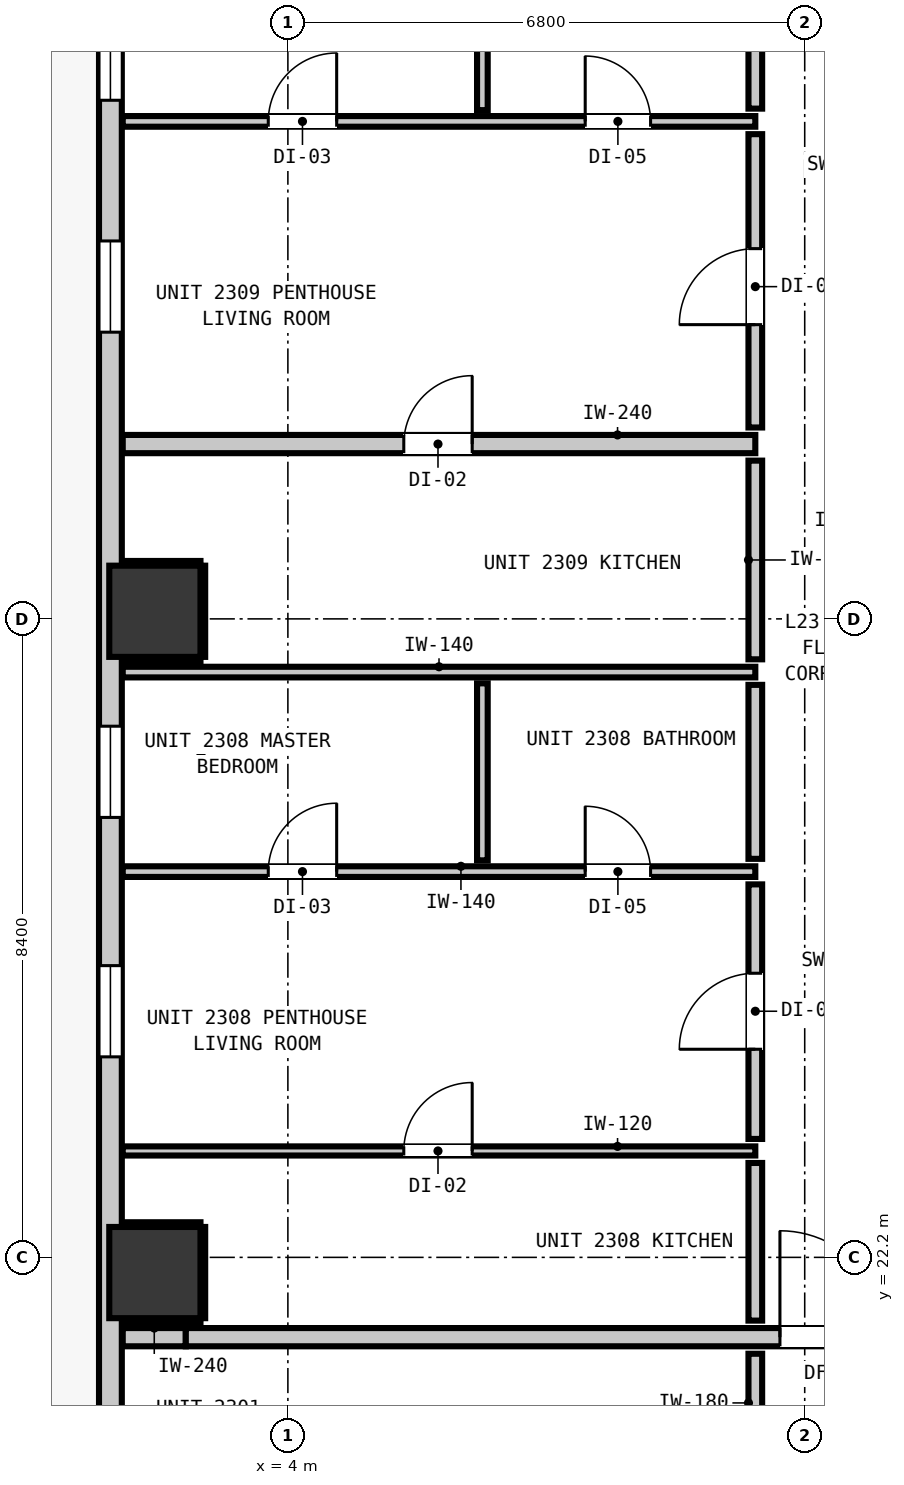
"""IFC4 building model, lengths in metres.
Left out: names, types, materials, properties, quantities, classifications, styles, units other than length and angle.
Written with IfcOpenShell. Run it as: python <this file> out.ifc"""

import sys

from ifc_helpers import new_model, si_unit, direction, frame, frame_2d, origin, origin_2d, place, context, subcontext, project, spatial, rectangle, extrude, element, fill, save


model = new_model("IFC4")
c1 = context("Model", 3, precision=1e-05, world=origin(), true_north=direction((0.0, 1.0)))
c2 = subcontext(c1, "Body", "Model", "MODEL_VIEW")
j1 = project(units=[si_unit("LENGTHUNIT", "METRE"), si_unit("PLANEANGLEUNIT", "RADIAN")], contexts=[c1])
p1 = place(None, origin())
s1 = spatial("IfcSite", under=j1, at=p1, CompositionType="ELEMENT")
p2 = place(p1, origin())
s2 = spatial("IfcBuilding", under=s1, at=p2, CompositionType="ELEMENT")
p3 = place(p2, frame((0.0, 0.0, 81.76)))
s3 = spatial("IfcBuildingStorey", under=s2, at=p3, CompositionType="ELEMENT", Elevation=81.76)
for number, where, z_axis, x_axis in (
    (1, (2.25, 22.0, -0.2), (0.0, 0.0, 1.0), (1.0, 0.0, 0.0)),
    (2, (2.25, 30.7, -0.2), (0.0, 0.0, 1.0), (1.0, 0.0, 0.0)),
):
    element("IfcColumn", number, at=place(p3, frame(where, z_axis=z_axis, x_axis=x_axis)), inside=s3, PredefinedType="COLUMN", context=c2, shape_type="SweptSolid", body=[
        extrude(rectangle(XDim=1.2, YDim=1.2, at=origin_2d()), origin(), (0.0, 0.0, 1.0), 3.52),
    ])
p4 = place(p3, frame((1.665, 16.365, 0.0), z_axis=(0.0, 0.0, 1.0), x_axis=(0.0, 1.0, 0.0)))
e3 = element("IfcWall", 3, at=p4, inside=s3, PredefinedType="STANDARD", context=c2, shape_type="SweptSolid", body=[
    extrude(rectangle(XDim=34.67, YDim=0.3, at=frame_2d((17.335, 0.0))), origin(), (0.0, 0.0, 1.0), 3.06),
])
p5 = place(p4, frame((1.251, 0.0, 0.0)))
e4 = element("IfcOpeningElement", 4, at=p5, cuts=e3, PredefinedType="OPENING", context=c2, shape_type="SweptSolid", body=[
    extrude(rectangle(XDim=1.0, YDim=2.15, at=frame_2d((0.5, 1.075))), frame((0.0, 0.16, 0.0), z_axis=(0.0, -1.0, 0.0), x_axis=(1.0, 0.0, 0.0)), (0.0, 0.0, 1.0), 0.32),
])
p6 = place(p4, frame((32.658, 0.0, 0.85)))
e5 = element("IfcOpeningElement", 5, at=p6, cuts=e3, PredefinedType="OPENING", context=c2, shape_type="SweptSolid", body=[
    extrude(rectangle(XDim=1.2, YDim=1.8, at=frame_2d((0.6, 0.9))), frame((0.0, 0.16, 0.0), z_axis=(0.0, -1.0, 0.0), x_axis=(1.0, 0.0, 0.0)), (0.0, 0.0, 1.0), 0.32),
])
p7 = place(p4, frame((8.473, 0.0, 0.85)))
e6 = element("IfcOpeningElement", 6, at=p7, cuts=e3, PredefinedType="OPENING", context=c2, shape_type="SweptSolid", body=[
    extrude(rectangle(XDim=1.2, YDim=1.8, at=frame_2d((0.6, 0.9))), frame((0.0, 0.16, 0.0), z_axis=(0.0, -1.0, 0.0), x_axis=(1.0, 0.0, 0.0)), (0.0, 0.0, 1.0), 0.32),
])
p8 = place(p4, frame((11.623, 0.0, 0.85)))
e7 = element("IfcOpeningElement", 7, at=p8, cuts=e3, PredefinedType="OPENING", context=c2, shape_type="SweptSolid", body=[
    extrude(rectangle(XDim=1.2, YDim=1.8, at=frame_2d((0.6, 0.9))), frame((0.0, 0.16, 0.0), z_axis=(0.0, -1.0, 0.0), x_axis=(1.0, 0.0, 0.0)), (0.0, 0.0, 1.0), 0.32),
])
p9 = place(p4, frame((18.007, 0.0, 0.85)))
e8 = element("IfcOpeningElement", 8, at=p9, cuts=e3, PredefinedType="OPENING", context=c2, shape_type="SweptSolid", body=[
    extrude(rectangle(XDim=1.2, YDim=1.8, at=frame_2d((0.6, 0.9))), frame((0.0, 0.16, 0.0), z_axis=(0.0, -1.0, 0.0), x_axis=(1.0, 0.0, 0.0)), (0.0, 0.0, 1.0), 0.32),
])
p10 = place(p4, frame((21.058, 0.0, 0.85)))
e9 = element("IfcOpeningElement", 9, at=p10, cuts=e3, PredefinedType="OPENING", context=c2, shape_type="SweptSolid", body=[
    extrude(rectangle(XDim=1.2, YDim=1.8, at=frame_2d((0.6, 0.9))), frame((0.0, 0.16, 0.0), z_axis=(0.0, -1.0, 0.0), x_axis=(1.0, 0.0, 0.0)), (0.0, 0.0, 1.0), 0.32),
])
p11 = place(p3, frame((1.827, 21.15, 0.0), z_axis=(0.0, 0.0, 1.0), x_axis=(1.0, 0.0, 0.0)))
e10 = element("IfcWall", 10, at=p11, inside=s3, PredefinedType="PARTITIONING", context=c2, shape_type="SweptSolid", body=[
    extrude(rectangle(XDim=0.83, YDim=0.24, at=frame_2d((0.415, 0.0))), origin(), (0.0, 0.0, 1.0), 3.06),
])
p12 = place(p3, frame((2.657, 21.15, 0.0), z_axis=(0.0, 0.0, 1.0), x_axis=(1.0, 0.0, 0.0)))
e11 = element("IfcWall", 11, at=p12, inside=s3, PredefinedType="PARTITIONING", context=c2, shape_type="SweptSolid", body=[
    extrude(rectangle(XDim=10.336, YDim=0.24, at=frame_2d((5.168, 0.0))), origin(), (0.0, 0.0, 1.0), 2.445),
])
p13 = place(p12, frame((7.817, 0.0, 0.0)))
e12 = element("IfcOpeningElement", 12, at=p13, cuts=e11, PredefinedType="OPENING", context=c2, shape_type="SweptSolid", body=[
    extrude(rectangle(XDim=1.4, YDim=2.15, at=frame_2d((0.7, 1.075))), frame((0.0, 0.13, 0.0), z_axis=(0.0, -1.0, 0.0), x_axis=(1.0, 0.0, 0.0)), (0.0, 0.0, 1.0), 0.26),
])
p14 = place(p3, frame((1.827, 32.9, 0.0), z_axis=(0.0, 0.0, 1.0), x_axis=(1.0, 0.0, 0.0)))
e13 = element("IfcWall", 13, at=p14, inside=s3, PredefinedType="PARTITIONING", context=c2, shape_type="SweptSolid", body=[
    extrude(rectangle(XDim=8.323, YDim=0.24, at=frame_2d((4.162, 0.0))), origin(), (0.0, 0.0, 1.0), 3.06),
])
p15 = place(p14, frame((3.698, 0.0, 0.0)))
e14 = element("IfcOpeningElement", 14, at=p15, cuts=e13, PredefinedType="OPENING", context=c2, shape_type="SweptSolid", body=[
    extrude(rectangle(XDim=0.9, YDim=2.1, at=frame_2d((0.45, 1.05))), frame((0.0, 0.13, 0.0), z_axis=(0.0, -1.0, 0.0), x_axis=(1.0, 0.0, 0.0)), (0.0, 0.0, 1.0), 0.26),
])
p16 = place(p3, frame((1.827, 27.275, 0.0), z_axis=(0.0, 0.0, 1.0), x_axis=(1.0, 0.0, 0.0)))
e15 = element("IfcWall", 15, at=p16, inside=s3, PredefinedType="PARTITIONING", context=c2, shape_type="SweptSolid", body=[
    extrude(rectangle(XDim=8.323, YDim=0.14, at=frame_2d((4.162, 0.0))), origin(), (0.0, 0.0, 1.0), 3.06),
])
p17 = place(p16, frame((6.085, 0.0, 0.0)))
e16 = element("IfcOpeningElement", 16, at=p17, cuts=e15, PredefinedType="OPENING", context=c2, shape_type="SweptSolid", body=[
    extrude(rectangle(XDim=0.86, YDim=2.02, at=frame_2d((0.43, 1.01))), frame((0.0, 0.08, 0.0), z_axis=(0.0, -1.0, 0.0), x_axis=(1.0, 0.0, 0.0)), (0.0, 0.0, 1.0), 0.16),
])
p18 = place(p16, frame((1.915, 0.0, 0.0)))
e17 = element("IfcOpeningElement", 17, at=p18, cuts=e15, PredefinedType="OPENING", context=c2, shape_type="SweptSolid", body=[
    extrude(rectangle(XDim=0.9, YDim=2.1, at=frame_2d((0.45, 1.05))), frame((0.0, 0.08, 0.0), z_axis=(0.0, -1.0, 0.0), x_axis=(1.0, 0.0, 0.0)), (0.0, 0.0, 1.0), 0.16),
])
p19 = place(p3, frame((1.827, 29.9, 0.0), z_axis=(0.0, 0.0, 1.0), x_axis=(1.0, 0.0, 0.0)))
e18 = element("IfcWall", 18, at=p19, inside=s3, PredefinedType="PARTITIONING", context=c2, shape_type="SweptSolid", body=[
    extrude(rectangle(XDim=8.323, YDim=0.14, at=frame_2d((4.162, 0.0))), origin(), (0.0, 0.0, 1.0), 3.06),
])
p20 = place(p3, frame((1.827, 37.145, 0.0), z_axis=(0.0, 0.0, 1.0), x_axis=(1.0, 0.0, 0.0)))
e19 = element("IfcWall", 19, at=p20, inside=s3, PredefinedType="PARTITIONING", context=c2, shape_type="SweptSolid", body=[
    extrude(rectangle(XDim=8.323, YDim=0.14, at=frame_2d((4.162, 0.0))), origin(), (0.0, 0.0, 1.0), 3.06),
])
p21 = place(p20, frame((6.085, 0.0, 0.0)))
e20 = element("IfcOpeningElement", 20, at=p21, cuts=e19, PredefinedType="OPENING", context=c2, shape_type="SweptSolid", body=[
    extrude(rectangle(XDim=0.86, YDim=2.02, at=frame_2d((0.43, 1.01))), frame((0.0, 0.08, 0.0), z_axis=(0.0, -1.0, 0.0), x_axis=(1.0, 0.0, 0.0)), (0.0, 0.0, 1.0), 0.16),
])
p22 = place(p20, frame((1.915, 0.0, 0.0)))
e21 = element("IfcOpeningElement", 21, at=p22, cuts=e19, PredefinedType="OPENING", context=c2, shape_type="SweptSolid", body=[
    extrude(rectangle(XDim=0.9, YDim=2.1, at=frame_2d((0.45, 1.05))), frame((0.0, 0.08, 0.0), z_axis=(0.0, -1.0, 0.0), x_axis=(1.0, 0.0, 0.0)), (0.0, 0.0, 1.0), 0.16),
])
p23 = place(p3, frame((1.827, 23.6, 0.0), z_axis=(0.0, 0.0, 1.0), x_axis=(1.0, 0.0, 0.0)))
e22 = element("IfcWall", 22, at=p23, inside=s3, PredefinedType="PARTITIONING", context=c2, shape_type="SweptSolid", body=[
    extrude(rectangle(XDim=8.323, YDim=0.12, at=frame_2d((4.162, 0.0))), origin(), (0.0, 0.0, 1.0), 3.06),
])
p24 = place(p23, frame((3.698, 0.0, 0.0)))
e23 = element("IfcOpeningElement", 23, at=p24, cuts=e22, PredefinedType="OPENING", context=c2, shape_type="SweptSolid", body=[
    extrude(rectangle(XDim=0.9, YDim=2.1, at=frame_2d((0.45, 1.05))), frame((0.0, 0.07, 0.0), z_axis=(0.0, -1.0, 0.0), x_axis=(1.0, 0.0, 0.0)), (0.0, 0.0, 1.0), 0.14),
])
p25 = place(p3, frame((10.15, 19.638, 0.0), z_axis=(0.0, 0.0, 1.0), x_axis=(0.0, 1.0, 0.0)))
e24 = element("IfcWall", 24, at=p25, inside=s3, PredefinedType="PARTITIONING", context=c2, shape_type="SweptSolid", body=[
    extrude(rectangle(XDim=1.294, YDim=0.18, at=frame_2d((0.647, 0.0))), origin(), (0.0, 0.0, 1.0), 3.06),
])
p26 = place(p3, frame((10.15, 21.368, 0.0), z_axis=(0.0, 0.0, 1.0), x_axis=(0.0, 1.0, 0.0)))
e25 = element("IfcWall", 25, at=p26, inside=s3, PredefinedType="PARTITIONING", context=c2, shape_type="SweptSolid", body=[
    extrude(rectangle(XDim=2.074, YDim=0.18, at=frame_2d((1.037, 0.0))), origin(), (0.0, 0.0, 1.0), 3.06),
])
p27 = place(p3, frame((10.15, 23.758, 0.0), z_axis=(0.0, 0.0, 1.0), x_axis=(0.0, 1.0, 0.0)))
e26 = element("IfcWall", 26, at=p27, inside=s3, PredefinedType="PARTITIONING", context=c2, shape_type="SweptSolid", body=[
    extrude(rectangle(XDim=3.349, YDim=0.18, at=frame_2d((1.674, 0.0))), origin(), (0.0, 0.0, 1.0), 3.06),
])
p28 = place(p27, frame((1.18, 0.0, 0.0)))
e27 = element("IfcOpeningElement", 27, at=p28, cuts=e26, PredefinedType="OPENING", context=c2, shape_type="SweptSolid", body=[
    extrude(rectangle(XDim=1.0, YDim=2.15, at=frame_2d((0.5, 1.075))), frame((0.0, 0.1, 0.0), z_axis=(0.0, -1.0, 0.0), x_axis=(1.0, 0.0, 0.0)), (0.0, 0.0, 1.0), 0.2),
])
p29 = place(p3, frame((10.15, 27.443, 0.0), z_axis=(0.0, 0.0, 1.0), x_axis=(0.0, 1.0, 0.0)))
e28 = element("IfcWall", 28, at=p29, inside=s3, PredefinedType="PARTITIONING", context=c2, shape_type="SweptSolid", body=[
    extrude(rectangle(XDim=2.289, YDim=0.18, at=frame_2d((1.145, 0.0))), origin(), (0.0, 0.0, 1.0), 3.06),
])
p30 = place(p3, frame((10.15, 30.068, 0.0), z_axis=(0.0, 0.0, 1.0), x_axis=(0.0, 1.0, 0.0)))
e29 = element("IfcWall", 29, at=p30, inside=s3, PredefinedType="PARTITIONING", context=c2, shape_type="SweptSolid", body=[
    extrude(rectangle(XDim=2.614, YDim=0.18, at=frame_2d((1.307, 0.0))), origin(), (0.0, 0.0, 1.0), 3.06),
])
p31 = place(p3, frame((10.15, 33.118, 0.0), z_axis=(0.0, 0.0, 1.0), x_axis=(0.0, 1.0, 0.0)))
e30 = element("IfcWall", 30, at=p31, inside=s3, PredefinedType="PARTITIONING", context=c2, shape_type="SweptSolid", body=[
    extrude(rectangle(XDim=3.859, YDim=0.18, at=frame_2d((1.93, 0.0))), origin(), (0.0, 0.0, 1.0), 3.06),
])
p32 = place(p31, frame((1.353, 0.0, 0.0)))
e31 = element("IfcOpeningElement", 31, at=p32, cuts=e30, PredefinedType="OPENING", context=c2, shape_type="SweptSolid", body=[
    extrude(rectangle(XDim=1.0, YDim=2.15, at=frame_2d((0.5, 1.075))), frame((0.0, 0.1, 0.0), z_axis=(0.0, -1.0, 0.0), x_axis=(1.0, 0.0, 0.0)), (0.0, 0.0, 1.0), 0.2),
])
p33 = place(p3, frame((10.15, 37.313, 0.0), z_axis=(0.0, 0.0, 1.0), x_axis=(0.0, 1.0, 0.0)))
e32 = element("IfcWall", 32, at=p33, inside=s3, PredefinedType="PARTITIONING", context=c2, shape_type="SweptSolid", body=[
    extrude(rectangle(XDim=2.749, YDim=0.18, at=frame_2d((1.375, 0.0))), origin(), (0.0, 0.0, 1.0), 3.06),
])
p34 = place(p3, frame((6.559, 27.423, 0.0), z_axis=(0.0, 0.0, 1.0), x_axis=(0.0, 1.0, 0.0)))
e33 = element("IfcWall", 33, at=p34, inside=s3, PredefinedType="PARTITIONING", context=c2, shape_type="SweptSolid", body=[
    extrude(rectangle(XDim=2.329, YDim=0.14, at=frame_2d((1.165, 0.0))), origin(), (0.0, 0.0, 1.0), 3.06),
])
p35 = place(p3, frame((6.559, 37.293, 0.0), z_axis=(0.0, 0.0, 1.0), x_axis=(0.0, 1.0, 0.0)))
e34 = element("IfcWall", 34, at=p35, inside=s3, PredefinedType="PARTITIONING", context=c2, shape_type="SweptSolid", body=[
    extrude(rectangle(XDim=2.789, YDim=0.14, at=frame_2d((1.395, 0.0))), origin(), (0.0, 0.0, 1.0), 3.06),
])
for number, where, z_axis, x_axis in (
    (35, (1.83, 21.368, 0.0), (0.0, 0.0, 1.0), (1.0, 0.0, 0.0)),
    (36, (1.83, 22.632, 0.0), (0.0, 0.0, 1.0), (1.0, 0.0, 0.0)),
):
    element("IfcWall", number, at=place(p3, frame(where, z_axis=z_axis, x_axis=x_axis)), inside=s3, PredefinedType="PARTITIONING", context=c2, shape_type="SweptSolid", body=[
        extrude(rectangle(XDim=1.02, YDim=0.06, at=frame_2d((0.51, 0.0))), origin(), (0.0, 0.0, 1.0), 1.45),
    ])
p36 = place(p3, frame((2.882, 21.4, 0.0), z_axis=(0.0, 0.0, 1.0), x_axis=(0.0, 1.0, 0.0)))
e37 = element("IfcWall", 37, at=p36, inside=s3, PredefinedType="PARTITIONING", context=c2, shape_type="SweptSolid", body=[
    extrude(rectangle(XDim=1.2, YDim=0.06, at=frame_2d((0.6, 0.0))), origin(), (0.0, 0.0, 1.0), 1.45),
])
for number, where, z_axis, x_axis in (
    (38, (1.83, 30.068, 0.0), (0.0, 0.0, 1.0), (1.0, 0.0, 0.0)),
    (39, (1.83, 31.332, 0.0), (0.0, 0.0, 1.0), (1.0, 0.0, 0.0)),
):
    element("IfcWall", number, at=place(p3, frame(where, z_axis=z_axis, x_axis=x_axis)), inside=s3, PredefinedType="PARTITIONING", context=c2, shape_type="SweptSolid", body=[
        extrude(rectangle(XDim=1.02, YDim=0.06, at=frame_2d((0.51, 0.0))), origin(), (0.0, 0.0, 1.0), 1.45),
    ])
p37 = place(p3, frame((2.882, 30.1, 0.0), z_axis=(0.0, 0.0, 1.0), x_axis=(0.0, 1.0, 0.0)))
e40 = element("IfcWall", 40, at=p37, inside=s3, PredefinedType="PARTITIONING", context=c2, shape_type="SweptSolid", body=[
    extrude(rectangle(XDim=1.2, YDim=0.06, at=frame_2d((0.6, 0.0))), origin(), (0.0, 0.0, 1.0), 1.45),
])
p38 = place(p7, origin())
e41 = element("IfcWindow", 41, at=p38, inside=s3, PartitioningType="SINGLE_PANEL", PredefinedType="WINDOW", context=c2, shape_type="SweptSolid", body=[
    extrude(rectangle(XDim=1.2, YDim=1.8, at=frame_2d((0.6, 0.9))), frame((0.0, 0.03, 0.0), z_axis=(0.0, -1.0, 0.0), x_axis=(1.0, 0.0, 0.0)), (0.0, 0.0, 1.0), 0.06),
])
fill(e6, e41)
p39 = place(p8, origin())
e42 = element("IfcWindow", 42, at=p39, inside=s3, PartitioningType="SINGLE_PANEL", PredefinedType="WINDOW", context=c2, shape_type="SweptSolid", body=[
    extrude(rectangle(XDim=1.2, YDim=1.8, at=frame_2d((0.6, 0.9))), frame((0.0, 0.03, 0.0), z_axis=(0.0, -1.0, 0.0), x_axis=(1.0, 0.0, 0.0)), (0.0, 0.0, 1.0), 0.06),
])
fill(e7, e42)
p40 = place(p9, origin())
e43 = element("IfcWindow", 43, at=p40, inside=s3, PartitioningType="SINGLE_PANEL", PredefinedType="WINDOW", context=c2, shape_type="SweptSolid", body=[
    extrude(rectangle(XDim=1.2, YDim=1.8, at=frame_2d((0.6, 0.9))), frame((0.0, 0.03, 0.0), z_axis=(0.0, -1.0, 0.0), x_axis=(1.0, 0.0, 0.0)), (0.0, 0.0, 1.0), 0.06),
])
fill(e8, e43)
p41 = place(p10, origin())
e44 = element("IfcWindow", 44, at=p41, inside=s3, PartitioningType="SINGLE_PANEL", PredefinedType="WINDOW", context=c2, shape_type="SweptSolid", body=[
    extrude(rectangle(XDim=1.2, YDim=1.8, at=frame_2d((0.6, 0.9))), frame((0.0, 0.03, 0.0), z_axis=(0.0, -1.0, 0.0), x_axis=(1.0, 0.0, 0.0)), (0.0, 0.0, 1.0), 0.06),
])
fill(e9, e44)
p42 = place(p13, origin())
e45 = element("IfcDoor", 45, at=p42, inside=s3, OperationType="SINGLE_SWING_LEFT", PredefinedType="DOOR", context=c2, shape_type="SweptSolid", body=[
    extrude(rectangle(XDim=1.4, YDim=2.15, at=frame_2d((0.7, 1.075))), frame((0.0, 0.025, 0.0), z_axis=(0.0, -1.0, 0.0), x_axis=(1.0, 0.0, 0.0)), (0.0, 0.0, 1.0), 0.05),
])
fill(e12, e45)
p43 = place(p28, origin())
e46 = element("IfcDoor", 46, at=p43, inside=s3, OperationType="SINGLE_SWING_LEFT", PredefinedType="DOOR", context=c2, shape_type="SweptSolid", body=[
    extrude(rectangle(XDim=1.0, YDim=2.15, at=frame_2d((0.5, 1.075))), frame((0.0, 0.025, 0.0), z_axis=(0.0, -1.0, 0.0), x_axis=(1.0, 0.0, 0.0)), (0.0, 0.0, 1.0), 0.05),
])
fill(e27, e46)
p44 = place(p24, origin())
e47 = element("IfcDoor", 47, at=p44, inside=s3, OperationType="SINGLE_SWING_RIGHT", PredefinedType="DOOR", context=c2, shape_type="SweptSolid", body=[
    extrude(rectangle(XDim=0.9, YDim=2.1, at=frame_2d((0.45, 1.05))), frame((0.0, 0.025, 0.0), z_axis=(0.0, -1.0, 0.0), x_axis=(1.0, 0.0, 0.0)), (0.0, 0.0, 1.0), 0.05),
])
fill(e23, e47)
p45 = place(p17, origin())
e48 = element("IfcDoor", 48, at=p45, inside=s3, OperationType="SINGLE_SWING_LEFT", PredefinedType="DOOR", context=c2, shape_type="SweptSolid", body=[
    extrude(rectangle(XDim=0.86, YDim=2.02, at=frame_2d((0.43, 1.01))), frame((0.0, 0.025, 0.0), z_axis=(0.0, -1.0, 0.0), x_axis=(1.0, 0.0, 0.0)), (0.0, 0.0, 1.0), 0.05),
])
fill(e16, e48)
p46 = place(p18, origin())
e49 = element("IfcDoor", 49, at=p46, inside=s3, OperationType="SINGLE_SWING_RIGHT", PredefinedType="DOOR", context=c2, shape_type="SweptSolid", body=[
    extrude(rectangle(XDim=0.9, YDim=2.1, at=frame_2d((0.45, 1.05))), frame((0.0, 0.025, 0.0), z_axis=(0.0, -1.0, 0.0), x_axis=(1.0, 0.0, 0.0)), (0.0, 0.0, 1.0), 0.05),
])
fill(e17, e49)
p47 = place(p32, origin())
e50 = element("IfcDoor", 50, at=p47, inside=s3, OperationType="SINGLE_SWING_LEFT", PredefinedType="DOOR", context=c2, shape_type="SweptSolid", body=[
    extrude(rectangle(XDim=1.0, YDim=2.15, at=frame_2d((0.5, 1.075))), frame((0.0, 0.025, 0.0), z_axis=(0.0, -1.0, 0.0), x_axis=(1.0, 0.0, 0.0)), (0.0, 0.0, 1.0), 0.05),
])
fill(e31, e50)
p48 = place(p15, origin())
e51 = element("IfcDoor", 51, at=p48, inside=s3, OperationType="SINGLE_SWING_RIGHT", PredefinedType="DOOR", context=c2, shape_type="SweptSolid", body=[
    extrude(rectangle(XDim=0.9, YDim=2.1, at=frame_2d((0.45, 1.05))), frame((0.0, 0.025, 0.0), z_axis=(0.0, -1.0, 0.0), x_axis=(1.0, 0.0, 0.0)), (0.0, 0.0, 1.0), 0.05),
])
fill(e14, e51)
p49 = place(p21, origin())
e52 = element("IfcDoor", 52, at=p49, inside=s3, OperationType="SINGLE_SWING_LEFT", PredefinedType="DOOR", context=c2, shape_type="SweptSolid", body=[
    extrude(rectangle(XDim=0.86, YDim=2.02, at=frame_2d((0.43, 1.01))), frame((0.0, 0.025, 0.0), z_axis=(0.0, -1.0, 0.0), x_axis=(1.0, 0.0, 0.0)), (0.0, 0.0, 1.0), 0.05),
])
fill(e20, e52)
p50 = place(p22, origin())
e53 = element("IfcDoor", 53, at=p50, inside=s3, OperationType="SINGLE_SWING_RIGHT", PredefinedType="DOOR", context=c2, shape_type="SweptSolid", body=[
    extrude(rectangle(XDim=0.9, YDim=2.1, at=frame_2d((0.45, 1.05))), frame((0.0, 0.025, 0.0), z_axis=(0.0, -1.0, 0.0), x_axis=(1.0, 0.0, 0.0)), (0.0, 0.0, 1.0), 0.05),
])
fill(e21, e53)
save(model, sys.argv[1])
